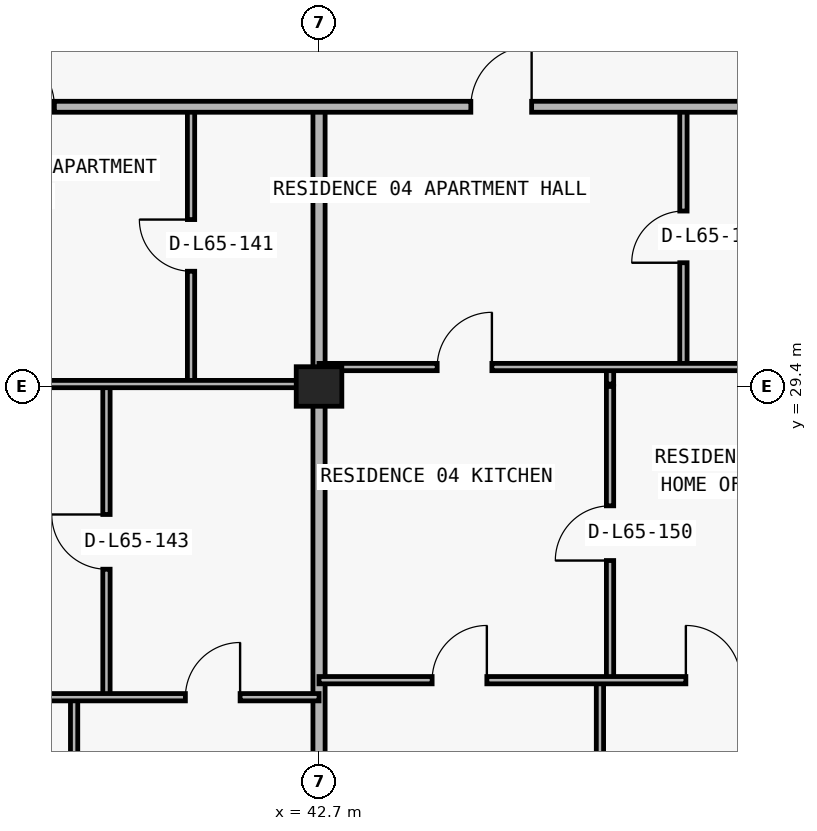
"""IFC4 building model, lengths in metres.
Left out: names, types, materials, properties, quantities, classifications, styles, units other than length and angle.
Written with IfcOpenShell. Run it as: python <this file> out.ifc"""

import sys

from ifc_helpers import new_model, si_unit, direction, frame, frame_2d, origin, origin_2d, place, context, subcontext, project, spatial, rectangle, extrude, element, fill, save


model = new_model("IFC4")
c1 = context("Model", 3, precision=1e-05, world=origin(), true_north=direction((0.0, 1.0)))
c2 = subcontext(c1, "Body", "Model", "MODEL_VIEW")
j1 = project(units=[si_unit("LENGTHUNIT", "METRE"), si_unit("PLANEANGLEUNIT", "RADIAN")], contexts=[c1])
p1 = place(None, origin())
s1 = spatial("IfcSite", under=j1, at=p1, CompositionType="ELEMENT")
p2 = place(p1, origin())
s2 = spatial("IfcBuilding", under=s1, at=p2, CompositionType="ELEMENT")
p3 = place(p2, frame((0.0, 0.0, 233.1)))
s3 = spatial("IfcBuildingStorey", under=s2, at=p3, CompositionType="ELEMENT", Elevation=233.1)
p4 = place(p3, frame((42.7, 29.4, 0.0), z_axis=(0.0, 0.0, 1.0), x_axis=(1.0, 0.0, 0.0)))
e1 = element("IfcColumn", 1, at=p4, inside=s3, PredefinedType="COLUMN", context=c2, shape_type="SweptSolid", body=[
    extrude(rectangle(XDim=0.75, YDim=0.65, at=origin_2d()), origin(), (0.0, 0.0, 1.0), 3.05),
])
p5 = place(p3, frame((38.672, 13.34, 0.0), z_axis=(0.0, 0.0, 1.0), x_axis=(0.0, 1.0, 0.0)))
e2 = element("IfcWall", 2, at=p5, inside=s3, PredefinedType="PARTITIONING", context=c2, shape_type="SweptSolid", body=[
    extrude(rectangle(XDim=10.95, YDim=0.12, at=frame_2d((5.475, 0.0))), origin(), (0.0, 0.0, 1.0), 2.578),
])
p6 = place(p3, frame((39.204, 24.29, 0.0), z_axis=(0.0, 0.0, 1.0), x_axis=(0.0, 1.0, 0.0)))
e3 = element("IfcWall", 3, at=p6, inside=s3, PredefinedType="PARTITIONING", context=c2, shape_type="SweptSolid", body=[
    extrude(rectangle(XDim=5.11, YDim=0.12, at=frame_2d((2.555, 0.0))), origin(), (0.0, 0.0, 1.0), 3.05),
])
p7 = place(p6, frame((2.105, 0.0, 0.0)))
e4 = element("IfcOpeningElement", 4, at=p7, cuts=e3, PredefinedType="OPENING", context=c2, shape_type="SweptSolid", body=[
    extrude(rectangle(XDim=0.9, YDim=2.15, at=frame_2d((0.45, 1.075))), frame((0.0, 0.07, 0.0), z_axis=(0.0, -1.0, 0.0), x_axis=(1.0, 0.0, 0.0)), (0.0, 0.0, 1.0), 0.14),
])
p8 = place(p3, frame((40.595, 29.44, 0.0), z_axis=(0.0, 0.0, 1.0), x_axis=(0.0, 1.0, 0.0)))
e5 = element("IfcWall", 5, at=p8, inside=s3, PredefinedType="PARTITIONING", context=c2, shape_type="SweptSolid", body=[
    extrude(rectangle(XDim=4.56, YDim=0.12, at=frame_2d((2.28, 0.0))), origin(), (0.0, 0.0, 1.0), 3.05),
])
p9 = place(p8, frame((1.855, 0.0, 0.0)))
e6 = element("IfcOpeningElement", 6, at=p9, cuts=e5, PredefinedType="OPENING", context=c2, shape_type="SweptSolid", body=[
    extrude(rectangle(XDim=0.85, YDim=2.1, at=frame_2d((0.425, 1.05))), frame((0.0, 0.07, 0.0), z_axis=(0.0, -1.0, 0.0), x_axis=(1.0, 0.0, 0.0)), (0.0, 0.0, 1.0), 0.14),
])
p10 = place(p3, frame((42.7, 13.34, 0.0), z_axis=(0.0, 0.0, 1.0), x_axis=(0.0, 1.0, 0.0)))
e7 = element("IfcWall", 7, at=p10, inside=s3, PredefinedType="PARTITIONING", context=c2, shape_type="SweptSolid", body=[
    extrude(rectangle(XDim=16.06, YDim=0.2, at=frame_2d((8.03, 0.0))), origin(), (0.0, 0.0, 1.0), 2.263),
])
p11 = place(p3, frame((42.7, 29.44, 0.0), z_axis=(0.0, 0.0, 1.0), x_axis=(0.0, 1.0, 0.0)))
e8 = element("IfcWall", 8, at=p11, inside=s3, PredefinedType="PARTITIONING", context=c2, shape_type="SweptSolid", body=[
    extrude(rectangle(XDim=4.56, YDim=0.2, at=frame_2d((2.28, 0.0))), origin(), (0.0, 0.0, 1.0), 2.263),
])
p12 = place(p3, frame((47.32, 13.34, 0.0), z_axis=(0.0, 0.0, 1.0), x_axis=(0.0, 1.0, 0.0)))
e9 = element("IfcWall", 9, at=p12, inside=s3, PredefinedType="PARTITIONING", context=c2, shape_type="SweptSolid", body=[
    extrude(rectangle(XDim=11.23, YDim=0.12, at=frame_2d((5.615, 0.0))), origin(), (0.0, 0.0, 1.0), 3.05),
])
p13 = place(p3, frame((47.486, 24.575, 0.0), z_axis=(0.0, 0.0, 1.0), x_axis=(0.0, 1.0, 0.0)))
e10 = element("IfcWall", 10, at=p13, inside=s3, PredefinedType="PARTITIONING", context=c2, shape_type="SweptSolid", body=[
    extrude(rectangle(XDim=4.825, YDim=0.12, at=frame_2d((2.413, 0.0))), origin(), (0.0, 0.0, 1.0), 3.05),
])
p14 = place(p13, frame((1.962, 0.0, 0.0)))
e11 = element("IfcOpeningElement", 11, at=p14, cuts=e10, PredefinedType="OPENING", context=c2, shape_type="SweptSolid", body=[
    extrude(rectangle(XDim=0.9, YDim=2.15, at=frame_2d((0.45, 1.075))), frame((0.0, 0.07, 0.0), z_axis=(0.0, -1.0, 0.0), x_axis=(1.0, 0.0, 0.0)), (0.0, 0.0, 1.0), 0.14),
])
p15 = place(p3, frame((47.486, 29.44, 0.0), z_axis=(0.0, 0.0, 1.0), x_axis=(0.0, 1.0, 0.0)))
e12 = element("IfcWall", 12, at=p15, inside=s3, PredefinedType="PARTITIONING", context=c2, shape_type="SweptSolid", body=[
    extrude(rectangle(XDim=0.28, YDim=0.12, at=frame_2d((0.14, 0.0))), origin(), (0.0, 0.0, 1.0), 3.05),
])
p16 = place(p3, frame((48.693, 29.72, 0.0), z_axis=(0.0, 0.0, 1.0), x_axis=(0.0, 1.0, 0.0)))
e13 = element("IfcWall", 13, at=p16, inside=s3, PredefinedType="PARTITIONING", context=c2, shape_type="SweptSolid", body=[
    extrude(rectangle(XDim=4.28, YDim=0.12, at=frame_2d((2.14, 0.0))), origin(), (0.0, 0.0, 1.0), 3.05),
])
p17 = place(p16, frame((1.715, 0.0, 0.0)))
e14 = element("IfcOpeningElement", 14, at=p17, cuts=e13, PredefinedType="OPENING", context=c2, shape_type="SweptSolid", body=[
    extrude(rectangle(XDim=0.85, YDim=2.1, at=frame_2d((0.425, 1.05))), frame((0.0, 0.07, 0.0), z_axis=(0.0, -1.0, 0.0), x_axis=(1.0, 0.0, 0.0)), (0.0, 0.0, 1.0), 0.14),
])
p18 = place(p3, frame((35.1, 24.29, 0.0), z_axis=(0.0, 0.0, 1.0), x_axis=(1.0, 0.0, 0.0)))
e15 = element("IfcWall", 15, at=p18, inside=s3, PredefinedType="PARTITIONING", context=c2, shape_type="SweptSolid", body=[
    extrude(rectangle(XDim=7.6, YDim=0.12, at=frame_2d((3.8, 0.0))), origin(), (0.0, 0.0, 1.0), 3.05),
])
p19 = place(p18, frame((1.336, 0.0, 0.0)))
e16 = element("IfcOpeningElement", 16, at=p19, cuts=e15, PredefinedType="OPENING", context=c2, shape_type="SweptSolid", body=[
    extrude(rectangle(XDim=0.9, YDim=2.15, at=frame_2d((0.45, 1.075))), frame((0.0, 0.07, 0.0), z_axis=(0.0, -1.0, 0.0), x_axis=(1.0, 0.0, 0.0)), (0.0, 0.0, 1.0), 0.14),
])
p20 = place(p18, frame((5.402, 0.0, 0.0)))
e17 = element("IfcOpeningElement", 17, at=p20, cuts=e15, PredefinedType="OPENING", context=c2, shape_type="SweptSolid", body=[
    extrude(rectangle(XDim=0.9, YDim=2.15, at=frame_2d((0.45, 1.075))), frame((0.0, 0.07, 0.0), z_axis=(0.0, -1.0, 0.0), x_axis=(1.0, 0.0, 0.0)), (0.0, 0.0, 1.0), 0.14),
])
p21 = place(p3, frame((42.7, 24.57, 0.0), z_axis=(0.0, 0.0, 1.0), x_axis=(1.0, 0.0, 0.0)))
e18 = element("IfcWall", 18, at=p21, inside=s3, PredefinedType="PARTITIONING", context=c2, shape_type="SweptSolid", body=[
    extrude(rectangle(XDim=8.18, YDim=0.12, at=frame_2d((4.09, 0.0))), origin(), (0.0, 0.0, 1.0), 3.05),
])
p22 = place(p21, frame((1.86, 0.0, 0.0)))
e19 = element("IfcOpeningElement", 19, at=p22, cuts=e18, PredefinedType="OPENING", context=c2, shape_type="SweptSolid", body=[
    extrude(rectangle(XDim=0.9, YDim=2.15, at=frame_2d((0.45, 1.075))), frame((0.0, 0.07, 0.0), z_axis=(0.0, -1.0, 0.0), x_axis=(1.0, 0.0, 0.0)), (0.0, 0.0, 1.0), 0.14),
])
p23 = place(p21, frame((6.033, 0.0, 0.0)))
e20 = element("IfcOpeningElement", 20, at=p23, cuts=e18, PredefinedType="OPENING", context=c2, shape_type="SweptSolid", body=[
    extrude(rectangle(XDim=0.9, YDim=2.15, at=frame_2d((0.45, 1.075))), frame((0.0, 0.07, 0.0), z_axis=(0.0, -1.0, 0.0), x_axis=(1.0, 0.0, 0.0)), (0.0, 0.0, 1.0), 0.14),
])
p24 = place(p3, frame((35.1, 29.44, 0.0), z_axis=(0.0, 0.0, 1.0), x_axis=(1.0, 0.0, 0.0)))
e21 = element("IfcWall", 21, at=p24, inside=s3, PredefinedType="PARTITIONING", context=c2, shape_type="SweptSolid", body=[
    extrude(rectangle(XDim=7.6, YDim=0.12, at=frame_2d((3.8, 0.0))), origin(), (0.0, 0.0, 1.0), 2.263),
])
p25 = place(p24, frame((1.602, 0.0, 0.0)))
e22 = element("IfcOpeningElement", 22, at=p25, cuts=e21, PredefinedType="OPENING", context=c2, shape_type="SweptSolid", body=[
    extrude(rectangle(XDim=0.9, YDim=2.15, at=frame_2d((0.45, 1.075))), frame((0.0, 0.07, 0.0), z_axis=(0.0, -1.0, 0.0), x_axis=(1.0, 0.0, 0.0)), (0.0, 0.0, 1.0), 0.14),
])
p26 = place(p3, frame((42.7, 29.72, 0.0), z_axis=(0.0, 0.0, 1.0), x_axis=(1.0, 0.0, 0.0)))
e23 = element("IfcWall", 23, at=p26, inside=s3, PredefinedType="PARTITIONING", context=c2, shape_type="SweptSolid", body=[
    extrude(rectangle(XDim=8.4, YDim=0.12, at=frame_2d((4.2, 0.0))), origin(), (0.0, 0.0, 1.0), 2.263),
])
p27 = place(p26, frame((1.943, 0.0, 0.0)))
e24 = element("IfcOpeningElement", 24, at=p27, cuts=e23, PredefinedType="OPENING", context=c2, shape_type="SweptSolid", body=[
    extrude(rectangle(XDim=0.9, YDim=2.15, at=frame_2d((0.45, 1.075))), frame((0.0, 0.07, 0.0), z_axis=(0.0, -1.0, 0.0), x_axis=(1.0, 0.0, 0.0)), (0.0, 0.0, 1.0), 0.14),
])
p28 = place(p3, frame((31.4, 34.0, 0.0), z_axis=(0.0, 0.0, 1.0), x_axis=(1.0, 0.0, 0.0)))
e25 = element("IfcWall", 25, at=p28, inside=s3, PredefinedType="PARTITIONING", context=c2, shape_type="SweptSolid", body=[
    extrude(rectangle(XDim=34.3, YDim=0.18, at=frame_2d((17.15, 0.0))), origin(), (0.0, 0.0, 1.0), 3.05),
])
p29 = place(p28, frame((5.948, 0.0, 0.0)))
e26 = element("IfcOpeningElement", 26, at=p29, cuts=e25, PredefinedType="OPENING", context=c2, shape_type="SweptSolid", body=[
    extrude(rectangle(XDim=1.0, YDim=2.2, at=frame_2d((0.5, 1.1))), frame((0.0, 0.1, 0.0), z_axis=(0.0, -1.0, 0.0), x_axis=(1.0, 0.0, 0.0)), (0.0, 0.0, 1.0), 0.2),
])
p30 = place(p28, frame((13.796, 0.0, 0.0)))
e27 = element("IfcOpeningElement", 27, at=p30, cuts=e25, PredefinedType="OPENING", context=c2, shape_type="SweptSolid", body=[
    extrude(rectangle(XDim=1.0, YDim=2.2, at=frame_2d((0.5, 1.1))), frame((0.0, 0.1, 0.0), z_axis=(0.0, -1.0, 0.0), x_axis=(1.0, 0.0, 0.0)), (0.0, 0.0, 1.0), 0.2),
])
p31 = place(p28, frame((22.409, 0.0, 0.0)))
e28 = element("IfcOpeningElement", 28, at=p31, cuts=e25, PredefinedType="OPENING", context=c2, shape_type="SweptSolid", body=[
    extrude(rectangle(XDim=1.0, YDim=2.2, at=frame_2d((0.5, 1.1))), frame((0.0, 0.1, 0.0), z_axis=(0.0, -1.0, 0.0), x_axis=(1.0, 0.0, 0.0)), (0.0, 0.0, 1.0), 0.2),
])
p32 = place(p29, origin())
e29 = element("IfcDoor", 29, at=p32, inside=s3, OperationType="SINGLE_SWING_LEFT", PredefinedType="DOOR", context=c2, shape_type="SweptSolid", body=[
    extrude(rectangle(XDim=1.0, YDim=2.2, at=frame_2d((0.5, 1.1))), frame((0.0, 0.025, 0.0), z_axis=(0.0, -1.0, 0.0), x_axis=(1.0, 0.0, 0.0)), (0.0, 0.0, 1.0), 0.05),
])
fill(e26, e29)
p33 = place(p9, origin())
e30 = element("IfcDoor", 30, at=p33, inside=s3, OperationType="SINGLE_SWING_RIGHT", PredefinedType="DOOR", context=c2, shape_type="SweptSolid", body=[
    extrude(rectangle(XDim=0.85, YDim=2.1, at=frame_2d((0.425, 1.05))), frame((0.0, 0.025, 0.0), z_axis=(0.0, -1.0, 0.0), x_axis=(1.0, 0.0, 0.0)), (0.0, 0.0, 1.0), 0.05),
])
fill(e6, e30)
p34 = place(p7, origin())
e31 = element("IfcDoor", 31, at=p34, inside=s3, OperationType="SINGLE_SWING_RIGHT", PredefinedType="DOOR", context=c2, shape_type="SweptSolid", body=[
    extrude(rectangle(XDim=0.9, YDim=2.15, at=frame_2d((0.45, 1.075))), frame((0.0, 0.025, 0.0), z_axis=(0.0, -1.0, 0.0), x_axis=(1.0, 0.0, 0.0)), (0.0, 0.0, 1.0), 0.05),
])
fill(e4, e31)
p35 = place(p20, origin())
e32 = element("IfcDoor", 32, at=p35, inside=s3, OperationType="SINGLE_SWING_RIGHT", PredefinedType="DOOR", context=c2, shape_type="SweptSolid", body=[
    extrude(rectangle(XDim=0.9, YDim=2.15, at=frame_2d((0.45, 1.075))), frame((0.0, 0.025, 0.0), z_axis=(0.0, -1.0, 0.0), x_axis=(1.0, 0.0, 0.0)), (0.0, 0.0, 1.0), 0.05),
])
fill(e17, e32)
p36 = place(p30, origin())
e33 = element("IfcDoor", 33, at=p36, inside=s3, OperationType="SINGLE_SWING_RIGHT", PredefinedType="DOOR", context=c2, shape_type="SweptSolid", body=[
    extrude(rectangle(XDim=1.0, YDim=2.2, at=frame_2d((0.5, 1.1))), frame((0.0, 0.025, 0.0), z_axis=(0.0, -1.0, 0.0), x_axis=(1.0, 0.0, 0.0)), (0.0, 0.0, 1.0), 0.05),
])
fill(e27, e33)
p37 = place(p17, origin())
e34 = element("IfcDoor", 34, at=p37, inside=s3, OperationType="SINGLE_SWING_LEFT", PredefinedType="DOOR", context=c2, shape_type="SweptSolid", body=[
    extrude(rectangle(XDim=0.85, YDim=2.1, at=frame_2d((0.425, 1.05))), frame((0.0, 0.025, 0.0), z_axis=(0.0, -1.0, 0.0), x_axis=(1.0, 0.0, 0.0)), (0.0, 0.0, 1.0), 0.05),
])
fill(e14, e34)
p38 = place(p27, origin())
e35 = element("IfcDoor", 35, at=p38, inside=s3, OperationType="SINGLE_SWING_RIGHT", PredefinedType="DOOR", context=c2, shape_type="SweptSolid", body=[
    extrude(rectangle(XDim=0.9, YDim=2.15, at=frame_2d((0.45, 1.075))), frame((0.0, 0.025, 0.0), z_axis=(0.0, -1.0, 0.0), x_axis=(1.0, 0.0, 0.0)), (0.0, 0.0, 1.0), 0.05),
])
fill(e24, e35)
p39 = place(p14, origin())
e36 = element("IfcDoor", 36, at=p39, inside=s3, OperationType="SINGLE_SWING_LEFT", PredefinedType="DOOR", context=c2, shape_type="SweptSolid", body=[
    extrude(rectangle(XDim=0.9, YDim=2.15, at=frame_2d((0.45, 1.075))), frame((0.0, 0.025, 0.0), z_axis=(0.0, -1.0, 0.0), x_axis=(1.0, 0.0, 0.0)), (0.0, 0.0, 1.0), 0.05),
])
fill(e11, e36)
p40 = place(p22, origin())
e37 = element("IfcDoor", 37, at=p40, inside=s3, OperationType="SINGLE_SWING_RIGHT", PredefinedType="DOOR", context=c2, shape_type="SweptSolid", body=[
    extrude(rectangle(XDim=0.9, YDim=2.15, at=frame_2d((0.45, 1.075))), frame((0.0, 0.025, 0.0), z_axis=(0.0, -1.0, 0.0), x_axis=(1.0, 0.0, 0.0)), (0.0, 0.0, 1.0), 0.05),
])
fill(e19, e37)
p41 = place(p23, origin())
e38 = element("IfcDoor", 38, at=p41, inside=s3, OperationType="SINGLE_SWING_LEFT", PredefinedType="DOOR", context=c2, shape_type="SweptSolid", body=[
    extrude(rectangle(XDim=0.9, YDim=2.15, at=frame_2d((0.45, 1.075))), frame((0.0, 0.025, 0.0), z_axis=(0.0, -1.0, 0.0), x_axis=(1.0, 0.0, 0.0)), (0.0, 0.0, 1.0), 0.05),
])
fill(e20, e38)
save(model, sys.argv[1])
